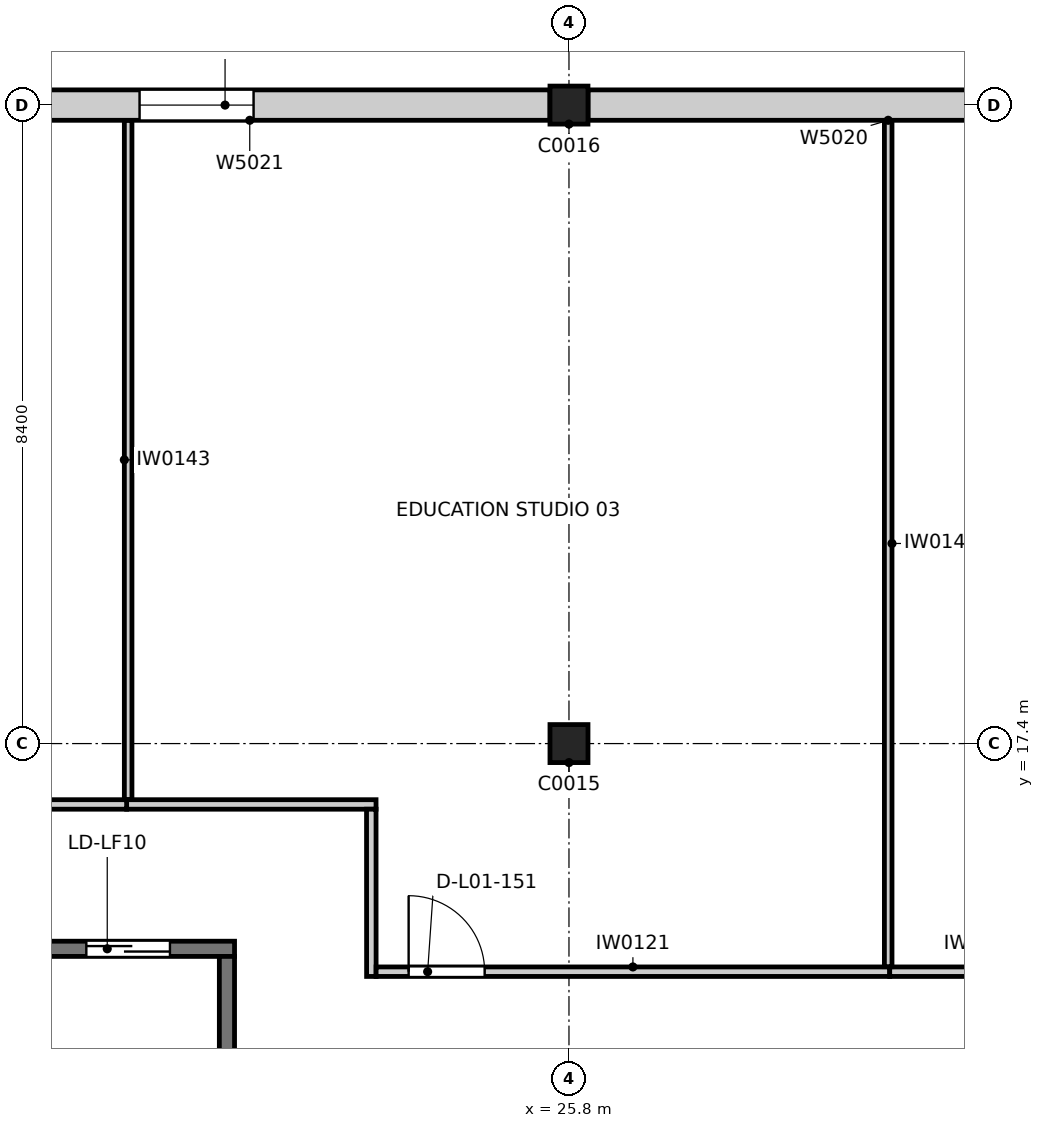
"""IFC4 building model, lengths in metres.
Left out: names, types, materials, properties, quantities, classifications, styles, units other than length and angle.
Written with IfcOpenShell. Run it as: python <this file> out.ifc"""

import sys

from ifc_helpers import new_model, si_unit, direction, frame, frame_2d, origin, origin_2d, place, context, subcontext, project, spatial, rectangle, extrude, element, fill, save


model = new_model("IFC4")
c1 = context("Model", 3, precision=1e-05, world=origin(), true_north=direction((0.0, 1.0)))
c2 = subcontext(c1, "Body", "Model", "MODEL_VIEW")
j1 = project(units=[si_unit("LENGTHUNIT", "METRE"), si_unit("PLANEANGLEUNIT", "RADIAN")], contexts=[c1])
p1 = place(None, origin())
s1 = spatial("IfcSite", under=j1, at=p1, CompositionType="ELEMENT")
p2 = place(p1, origin())
s2 = spatial("IfcBuilding", under=s1, at=p2, CompositionType="ELEMENT")
p3 = place(p2, frame((0.0, 0.0, 4.8)))
s3 = spatial("IfcBuildingStorey", under=s2, at=p3, CompositionType="ELEMENT", Elevation=4.8)
for number, where, z_axis, x_axis in (
    (1, (25.8, 17.4, 0.0), (0.0, 0.0, 1.0), (1.0, 0.0, 0.0)),
    (2, (25.8, 25.8, 0.0), (0.0, 0.0, 1.0), (1.0, 0.0, 0.0)),
):
    element("IfcColumn", number, at=place(p3, frame(where, z_axis=z_axis, x_axis=x_axis)), inside=s3, PredefinedType="COLUMN", context=c2, shape_type="SweptSolid", body=[
        extrude(rectangle(XDim=0.5, YDim=0.5, at=origin_2d()), origin(), (0.0, 0.0, 1.0), 4.8),
    ])
p4 = place(p3, frame((18.6, 14.7, 0.0), z_axis=(0.0, 0.0, 1.0), x_axis=(1.0, 0.0, 0.0)))
e3 = element("IfcWall", 3, at=p4, inside=s3, PredefinedType="SOLIDWALL", context=c2, shape_type="SweptSolid", body=[
    extrude(rectangle(XDim=2.8, YDim=0.2, at=frame_2d((1.4, 0.0))), origin(), (0.0, 0.0, 1.0), 4.8),
])
p5 = place(p4, frame((0.85, 0.0, 0.0)))
e4 = element("IfcOpeningElement", 4, at=p5, cuts=e3, PredefinedType="OPENING", context=c2, shape_type="SweptSolid", body=[
    extrude(rectangle(XDim=1.1, YDim=2.1, at=frame_2d((0.55, 1.05))), frame((0.0, 0.11, 0.0), z_axis=(0.0, -1.0, 0.0), x_axis=(1.0, 0.0, 0.0)), (0.0, 0.0, 1.0), 0.22),
])
p6 = place(p3, frame((21.3, 11.4, 0.0), z_axis=(0.0, 0.0, 1.0), x_axis=(0.0, 1.0, 0.0)))
e5 = element("IfcWall", 5, at=p6, inside=s3, PredefinedType="SOLIDWALL", context=c2, shape_type="SweptSolid", body=[
    extrude(rectangle(XDim=3.2, YDim=0.2, at=frame_2d((1.6, 0.0))), origin(), (0.0, 0.0, 1.0), 4.8),
])
p7 = place(p3, frame((19.98, 16.599, 0.0), z_axis=(0.0, 0.0, 1.0), x_axis=(1.0, 0.0, 0.0)))
e6 = element("IfcWall", 6, at=p7, inside=s3, PredefinedType="PARTITIONING", context=c2, shape_type="SweptSolid", body=[
    extrude(rectangle(XDim=3.281, YDim=0.125, at=frame_2d((1.641, 0.0))), origin(), (0.0, 0.0, 1.0), 4.64),
])
p8 = place(p3, frame((23.199, 16.537, 0.0), z_axis=(0.0, 0.0, 1.0), x_axis=(0.000443852597, -0.999999901497, 0.0)))
e7 = element("IfcWall", 7, at=p8, inside=s3, PredefinedType="PARTITIONING", context=c2, shape_type="SweptSolid", body=[
    extrude(rectangle(XDim=2.2, YDim=0.125, at=frame_2d((1.1, 0.0))), origin(), (0.0, 0.0, 1.0), 4.04),
])
p9 = place(p3, frame((23.262, 14.399, 0.0), z_axis=(0.0, 0.0, 1.0), x_axis=(1.0, 0.0, 0.0)))
e8 = element("IfcWall", 8, at=p9, inside=s3, PredefinedType="PARTITIONING", context=c2, shape_type="SweptSolid", body=[
    extrude(rectangle(XDim=6.758, YDim=0.125, at=frame_2d((3.379, 0.0))), origin(), (0.0, 0.0, 1.0), 3.84),
])
p10 = place(p9, frame((0.428, 0.0, 0.0)))
e9 = element("IfcOpeningElement", 9, at=p10, cuts=e8, PredefinedType="OPENING", context=c2, shape_type="SweptSolid", body=[
    extrude(rectangle(XDim=1.0, YDim=2.1, at=frame_2d((0.5, 1.05))), frame((0.0, 0.073, 0.0), z_axis=(0.0, -1.0, 0.0), x_axis=(1.0, 0.0, 0.0)), (0.0, 0.0, 1.0), 0.145),
])
p11 = place(p3, frame((30.02, 14.399, 0.0), z_axis=(0.0, 0.0, 1.0), x_axis=(1.0, 0.0, 0.0)))
e10 = element("IfcWall", 10, at=p11, inside=s3, PredefinedType="PARTITIONING", context=c2, shape_type="SweptSolid", body=[
    extrude(rectangle(XDim=2.393, YDim=0.125, at=frame_2d((1.196, 0.0))), origin(), (0.0, 0.0, 1.0), 4.04),
])
p12 = place(p3, frame((16.864, 16.599, 0.0), z_axis=(0.0, 0.0, 1.0), x_axis=(1.0, 0.0, 0.0)))
e11 = element("IfcWall", 11, at=p12, inside=s3, PredefinedType="PARTITIONING", context=c2, shape_type="SweptSolid", body=[
    extrude(rectangle(XDim=3.116, YDim=0.125, at=frame_2d((1.558, 0.0))), origin(), (0.0, 0.0, 1.0), 3.84),
])
p13 = place(p3, frame((30.0, 25.6, 0.0), z_axis=(0.0, 0.0, 1.0), x_axis=(0.0, -1.0, 0.0)))
e12 = element("IfcWall", 12, at=p13, inside=s3, PredefinedType="PARTITIONING", context=c2, shape_type="SweptSolid", body=[
    extrude(rectangle(XDim=11.135, YDim=0.1, at=frame_2d((5.567, 0.0))), origin(), (0.0, 0.0, 1.0), 3.84),
])
p14 = place(p3, frame((20.0, 16.665, 0.0), z_axis=(0.0, 0.0, 1.0), x_axis=(0.0, 1.0, 0.0)))
e13 = element("IfcWall", 13, at=p14, inside=s3, PredefinedType="PARTITIONING", context=c2, shape_type="SweptSolid", body=[
    extrude(rectangle(XDim=8.935, YDim=0.1, at=frame_2d((4.468, 0.0))), origin(), (0.0, 0.0, 1.0), 3.84),
])
p15 = place(p3, frame((33.95, 25.8, 0.0), z_axis=(0.0, 0.0, 1.0), x_axis=(-1.0, 0.0, 0.0)))
e14 = element("IfcWall", 14, at=p15, inside=s3, PredefinedType="SOLIDWALL", context=c2, shape_type="SweptSolid", body=[
    extrude(rectangle(XDim=7.9, YDim=0.4, at=frame_2d((3.95, 0.0))), origin(), (0.0, 0.0, 1.0), 3.84),
])
p16 = place(p3, frame((25.55, 25.8, 0.0), z_axis=(0.0, 0.0, 1.0), x_axis=(-1.0, 0.0, 0.0)))
e15 = element("IfcWall", 15, at=p16, inside=s3, PredefinedType="SOLIDWALL", context=c2, shape_type="SweptSolid", body=[
    extrude(rectangle(XDim=7.9, YDim=0.4, at=frame_2d((3.95, 0.0))), origin(), (0.0, 0.0, 1.0), 3.84),
])
p17 = place(p16, frame((3.9, 0.0, 0.9)))
e16 = element("IfcOpeningElement", 16, at=p17, cuts=e15, PredefinedType="OPENING", context=c2, shape_type="SweptSolid", body=[
    extrude(rectangle(XDim=1.5, YDim=1.5, at=frame_2d((0.75, 0.75))), frame((0.0, 0.21, 0.0), z_axis=(0.0, -1.0, 0.0), x_axis=(1.0, 0.0, 0.0)), (0.0, 0.0, 1.0), 0.42),
])
p18 = place(p10, origin())
e17 = element("IfcDoor", 17, at=p18, inside=s3, OperationType="SINGLE_SWING_LEFT", PredefinedType="DOOR", context=c2, shape_type="SweptSolid", body=[
    extrude(rectangle(XDim=1.0, YDim=2.1, at=frame_2d((0.5, 1.05))), frame((0.0, 0.025, 0.0), z_axis=(0.0, -1.0, 0.0), x_axis=(1.0, 0.0, 0.0)), (0.0, 0.0, 1.0), 0.05),
])
fill(e9, e17)
p19 = place(p17, origin())
e18 = element("IfcWindow", 18, at=p19, inside=s3, PartitioningType="DOUBLE_PANEL_VERTICAL", PredefinedType="WINDOW", context=c2, shape_type="SweptSolid", body=[
    extrude(rectangle(XDim=1.5, YDim=1.5, at=frame_2d((0.75, 0.75))), frame((0.0, 0.15, 0.0), z_axis=(0.0, -1.0, 0.0), x_axis=(1.0, 0.0, 0.0)), (0.0, 0.0, 1.0), 0.06),
])
fill(e16, e18)
p20 = place(p5, origin())
e19 = element("IfcDoor", 19, at=p20, inside=s3, OperationType="SLIDING_TO_LEFT", PredefinedType="DOOR", context=c2, shape_type="SweptSolid", body=[
    extrude(rectangle(XDim=1.1, YDim=2.1, at=frame_2d((0.55, 1.05))), frame((0.0, 0.025, 0.0), z_axis=(0.0, -1.0, 0.0), x_axis=(1.0, 0.0, 0.0)), (0.0, 0.0, 1.0), 0.05),
])
fill(e4, e19)
save(model, sys.argv[1])
